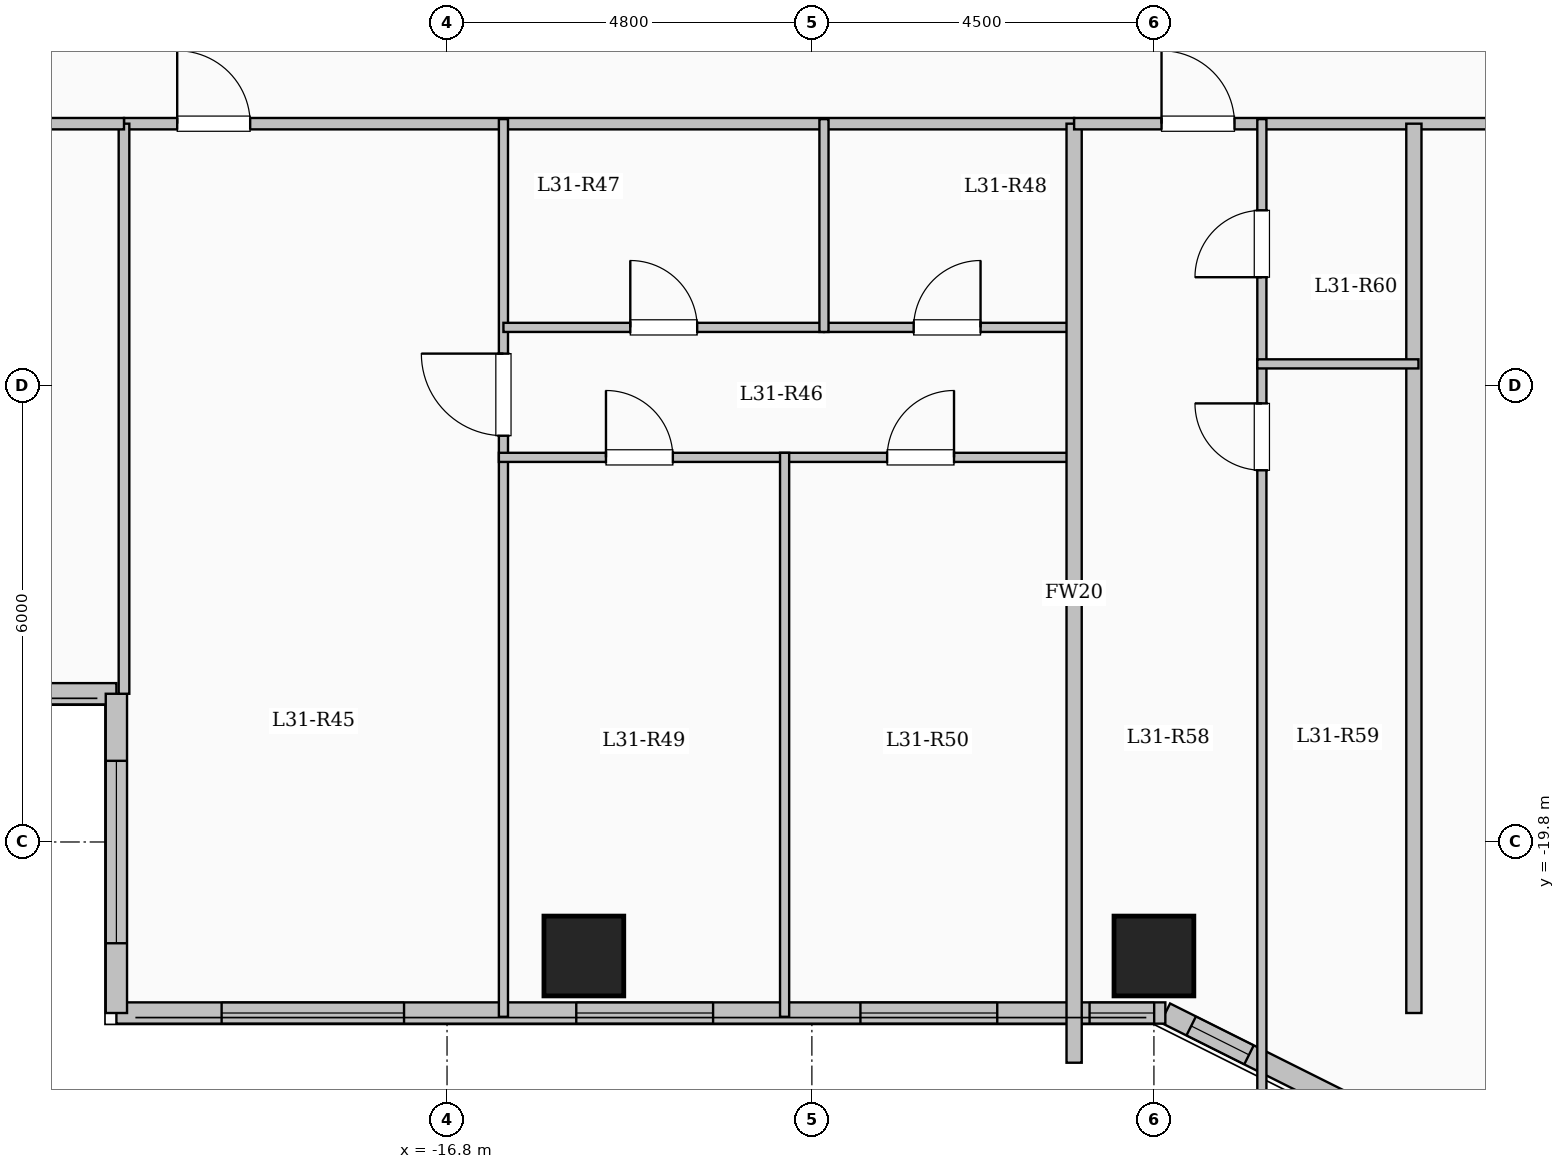
"""IFC4 building model, lengths in metres.
Left out: names, types, materials, properties, quantities, classifications, styles, units other than length and angle.
Written with IfcOpenShell. Run it as: python <this file> out.ifc"""

import sys

from ifc_helpers import new_model, si_unit, direction, frame, frame_2d, origin, origin_2d, place, context, subcontext, project, spatial, rectangle, extrude, element, fill, save


model = new_model("IFC4")
c1 = context("Model", 3, precision=1e-05, world=origin(), true_north=direction((0.0, 1.0)))
c2 = subcontext(c1, "Body", "Model", "MODEL_VIEW")
j1 = project(units=[si_unit("LENGTHUNIT", "METRE"), si_unit("PLANEANGLEUNIT", "RADIAN")], contexts=[c1])
p1 = place(None, origin())
s1 = spatial("IfcSite", under=j1, at=p1, CompositionType="ELEMENT")
p2 = place(p1, origin())
s2 = spatial("IfcBuilding", under=s1, at=p2, CompositionType="ELEMENT")
p3 = place(p2, frame((0.0, 0.0, 115.15)))
s3 = spatial("IfcBuildingStorey", under=s2, at=p3, CompositionType="ELEMENT", Elevation=115.15)
for number, where, z_axis, x_axis in (
    (1, (-15.0, -21.3, 0.0), (0.0, 0.0, 1.0), (1.0, 0.0, 0.0)),
    (2, (-7.5, -21.3, 0.0), (0.0, 0.0, 1.0), (1.0, 0.0, 0.0)),
):
    element("IfcColumn", number, at=place(p3, frame(where, z_axis=z_axis, x_axis=x_axis)), inside=s3, PredefinedType="COLUMN", context=c2, shape_type="SweptSolid", body=[
        extrude(rectangle(XDim=1.05, YDim=1.05, at=origin_2d()), origin(), (0.0, 0.0, 1.0), 3.35),
    ])
p4 = place(p3, frame((-21.15, -17.85, 0.0), z_axis=(0.0, 0.0, 1.0), x_axis=(-1.0, 0.0, 0.0)))
e3 = element("IfcWall", 3, at=p4, inside=s3, PredefinedType="SOLIDWALL", context=c2, shape_type="SweptSolid", body=[
    extrude(rectangle(XDim=5.7, YDim=0.28, at=frame_2d((2.85, 0.0))), origin(), (0.0, 0.0, 1.0), 3.05),
])
p5 = place(p4, frame((1.625, 0.0, 0.9)))
e4 = element("IfcOpeningElement", 4, at=p5, cuts=e3, PredefinedType="OPENING", context=c2, shape_type="SweptSolid", body=[
    extrude(rectangle(XDim=2.4, YDim=1.8, at=frame_2d((1.2, 0.9))), frame((0.0, 0.15, 0.0), z_axis=(0.0, -1.0, 0.0), x_axis=(1.0, 0.0, 0.0)), (0.0, 0.0, 1.0), 0.3),
])
p6 = place(p3, frame((-4.35, -23.55, 0.0), z_axis=(0.0, 0.0, 1.0), x_axis=(-0.894427191, 0.4472135955, 0.0)))
e5 = element("IfcWall", 5, at=p6, inside=s3, PredefinedType="SOLIDWALL", context=c2, shape_type="SweptSolid", body=[
    extrude(rectangle(XDim=3.354, YDim=0.28, at=frame_2d((1.677, 0.0))), origin(), (0.0, 0.0, 1.0), 3.05),
])
p7 = place(p6, frame((2.124, 0.0, 0.95)))
e6 = element("IfcOpeningElement", 6, at=p7, cuts=e5, PredefinedType="OPENING", context=c2, shape_type="SweptSolid", body=[
    extrude(rectangle(XDim=0.85, YDim=1.5, at=frame_2d((0.425, 0.75))), frame((0.0, 0.15, 0.0), z_axis=(0.0, -1.0, 0.0), x_axis=(1.0, 0.0, 0.0)), (0.0, 0.0, 1.0), 0.3),
])
p8 = place(p3, frame((-7.35, -22.05, 0.0), z_axis=(0.0, 0.0, 1.0), x_axis=(-1.0, 0.0, 0.0)))
e7 = element("IfcWall", 7, at=p8, inside=s3, PredefinedType="SOLIDWALL", context=c2, shape_type="SweptSolid", body=[
    extrude(rectangle(XDim=13.8, YDim=0.28, at=frame_2d((6.9, 0.0))), origin(), (0.0, 0.0, 1.0), 3.05),
])
p9 = place(p8, frame((0.147, 0.0, 0.95)))
e8 = element("IfcOpeningElement", 8, at=p9, cuts=e7, PredefinedType="OPENING", context=c2, shape_type="SweptSolid", body=[
    extrude(rectangle(XDim=0.85, YDim=1.5, at=frame_2d((0.425, 0.75))), frame((0.0, 0.15, 0.0), z_axis=(0.0, -1.0, 0.0), x_axis=(1.0, 0.0, 0.0)), (0.0, 0.0, 1.0), 0.3),
])
p10 = place(p8, frame((2.211, 0.0, 0.9)))
e9 = element("IfcOpeningElement", 9, at=p10, cuts=e7, PredefinedType="OPENING", context=c2, shape_type="SweptSolid", body=[
    extrude(rectangle(XDim=1.8, YDim=1.65, at=frame_2d((0.9, 0.825))), frame((0.0, 0.15, 0.0), z_axis=(0.0, -1.0, 0.0), x_axis=(1.0, 0.0, 0.0)), (0.0, 0.0, 1.0), 0.3),
])
p11 = place(p8, frame((5.95, 0.0, 0.9)))
e10 = element("IfcOpeningElement", 10, at=p11, cuts=e7, PredefinedType="OPENING", context=c2, shape_type="SweptSolid", body=[
    extrude(rectangle(XDim=1.8, YDim=1.65, at=frame_2d((0.9, 0.825))), frame((0.0, 0.15, 0.0), z_axis=(0.0, -1.0, 0.0), x_axis=(1.0, 0.0, 0.0)), (0.0, 0.0, 1.0), 0.3),
])
p12 = place(p8, frame((10.016, 0.0, 0.9)))
e11 = element("IfcOpeningElement", 11, at=p12, cuts=e7, PredefinedType="OPENING", context=c2, shape_type="SweptSolid", body=[
    extrude(rectangle(XDim=2.4, YDim=1.8, at=frame_2d((1.2, 0.9))), frame((0.0, 0.15, 0.0), z_axis=(0.0, -1.0, 0.0), x_axis=(1.0, 0.0, 0.0)), (0.0, 0.0, 1.0), 0.3),
])
p13 = place(p3, frame((-21.15, -22.05, 0.0), z_axis=(0.0, 0.0, 1.0), x_axis=(0.0, 1.0, 0.0)))
e12 = element("IfcWall", 12, at=p13, inside=s3, PredefinedType="SOLIDWALL", context=c2, shape_type="SweptSolid", body=[
    extrude(rectangle(XDim=4.2, YDim=0.28, at=frame_2d((2.1, 0.0))), origin(), (0.0, 0.0, 1.0), 3.05),
])
p14 = place(p13, frame((0.918, 0.0, 0.9)))
e13 = element("IfcOpeningElement", 13, at=p14, cuts=e12, PredefinedType="OPENING", context=c2, shape_type="SweptSolid", body=[
    extrude(rectangle(XDim=2.4, YDim=1.8, at=frame_2d((1.2, 0.9))), frame((0.0, 0.15, 0.0), z_axis=(0.0, -1.0, 0.0), x_axis=(1.0, 0.0, 0.0)), (0.0, 0.0, 1.0), 0.3),
])
p15 = place(p3, frame((-21.05, -10.35, 0.0), z_axis=(0.0, 0.0, 1.0), x_axis=(1.0, 0.0, 0.0)))
e14 = element("IfcWall", 14, at=p15, inside=s3, PredefinedType="PARTITIONING", context=c2, shape_type="SweptSolid", body=[
    extrude(rectangle(XDim=12.5, YDim=0.15, at=frame_2d((6.25, 0.0))), origin(), (0.0, 0.0, 1.0), 3.05),
])
p16 = place(p15, frame((0.7, 0.0, 0.0)))
e15 = element("IfcOpeningElement", 15, at=p16, cuts=e14, PredefinedType="OPENING", context=c2, shape_type="SweptSolid", body=[
    extrude(rectangle(XDim=0.96, YDim=2.15, at=frame_2d((0.48, 1.075))), frame((0.0, 0.085, 0.0), z_axis=(0.0, -1.0, 0.0), x_axis=(1.0, 0.0, 0.0)), (0.0, 0.0, 1.0), 0.17),
])
p17 = place(p3, frame((-16.058, -22.1, 0.0), z_axis=(0.0, 0.0, 1.0), x_axis=(0.0, 1.0, 0.0)))
e16 = element("IfcWall", 16, at=p17, inside=s3, PredefinedType="PARTITIONING", context=c2, shape_type="SweptSolid", body=[
    extrude(rectangle(XDim=11.81, YDim=0.12, at=frame_2d((5.905, 0.0))), origin(), (0.0, 0.0, 1.0), 3.05),
])
p18 = place(p17, frame((7.645, 0.0, 0.0)))
e17 = element("IfcOpeningElement", 17, at=p18, cuts=e16, PredefinedType="OPENING", context=c2, shape_type="SweptSolid", body=[
    extrude(rectangle(XDim=1.08, YDim=2.15, at=frame_2d((0.54, 1.075))), frame((0.0, 0.07, 0.0), z_axis=(0.0, -1.0, 0.0), x_axis=(1.0, 0.0, 0.0)), (0.0, 0.0, 1.0), 0.14),
])
p19 = place(p3, frame((-16.058, -13.03, 0.0), z_axis=(0.0, 0.0, 1.0), x_axis=(1.0, 0.0, 0.0)))
e18 = element("IfcWall", 18, at=p19, inside=s3, PredefinedType="PARTITIONING", context=c2, shape_type="SweptSolid", body=[
    extrude(rectangle(XDim=4.217, YDim=0.12, at=frame_2d((2.108, 0.0))), origin(), (0.0, 0.0, 1.0), 3.05),
])
p20 = place(p19, frame((1.669, 0.0, 0.0)))
e19 = element("IfcOpeningElement", 19, at=p20, cuts=e18, PredefinedType="OPENING", context=c2, shape_type="SweptSolid", body=[
    extrude(rectangle(XDim=0.88, YDim=2.1, at=frame_2d((0.44, 1.05))), frame((0.0, 0.07, 0.0), z_axis=(0.0, -1.0, 0.0), x_axis=(1.0, 0.0, 0.0)), (0.0, 0.0, 1.0), 0.14),
])
p21 = place(p3, frame((-11.841, -13.03, 0.0), z_axis=(0.0, 0.0, 1.0), x_axis=(1.0, 0.0, 0.0)))
e20 = element("IfcWall", 20, at=p21, inside=s3, PredefinedType="PARTITIONING", context=c2, shape_type="SweptSolid", body=[
    extrude(rectangle(XDim=3.241, YDim=0.12, at=frame_2d((1.621, 0.0))), origin(), (0.0, 0.0, 1.0), 3.05),
])
p22 = place(p21, frame((1.18, 0.0, 0.0)))
e21 = element("IfcOpeningElement", 21, at=p22, cuts=e20, PredefinedType="OPENING", context=c2, shape_type="SweptSolid", body=[
    extrude(rectangle(XDim=0.88, YDim=2.1, at=frame_2d((0.44, 1.05))), frame((0.0, 0.07, 0.0), z_axis=(0.0, -1.0, 0.0), x_axis=(1.0, 0.0, 0.0)), (0.0, 0.0, 1.0), 0.14),
])
p23 = place(p3, frame((-16.118, -14.74, 0.0), z_axis=(0.0, 0.0, 1.0), x_axis=(1.0, 0.0, 0.0)))
e22 = element("IfcWall", 22, at=p23, inside=s3, PredefinedType="PARTITIONING", context=c2, shape_type="SweptSolid", body=[
    extrude(rectangle(XDim=7.578, YDim=0.12, at=frame_2d((3.789, 0.0))), origin(), (0.0, 0.0, 1.0), 3.05),
])
p24 = place(p23, frame((1.409, 0.0, 0.0)))
e23 = element("IfcOpeningElement", 23, at=p24, cuts=e22, PredefinedType="OPENING", context=c2, shape_type="SweptSolid", body=[
    extrude(rectangle(XDim=0.88, YDim=2.1, at=frame_2d((0.44, 1.05))), frame((0.0, 0.07, 0.0), z_axis=(0.0, -1.0, 0.0), x_axis=(1.0, 0.0, 0.0)), (0.0, 0.0, 1.0), 0.14),
])
p25 = place(p23, frame((5.108, 0.0, 0.0)))
e24 = element("IfcOpeningElement", 24, at=p25, cuts=e22, PredefinedType="OPENING", context=c2, shape_type="SweptSolid", body=[
    extrude(rectangle(XDim=0.88, YDim=2.1, at=frame_2d((0.44, 1.05))), frame((0.0, 0.07, 0.0), z_axis=(0.0, -1.0, 0.0), x_axis=(1.0, 0.0, 0.0)), (0.0, 0.0, 1.0), 0.14),
])
p26 = place(p3, frame((-11.841, -13.09, 0.0), z_axis=(0.0, 0.0, 1.0), x_axis=(0.0, 1.0, 0.0)))
e25 = element("IfcWall", 25, at=p26, inside=s3, PredefinedType="PARTITIONING", context=c2, shape_type="SweptSolid", body=[
    extrude(rectangle(XDim=2.8, YDim=0.12, at=frame_2d((1.4, 0.0))), origin(), (0.0, 0.0, 1.0), 3.05),
])
p27 = place(p3, frame((-12.359, -22.1, 0.0), z_axis=(0.0, 0.0, 1.0), x_axis=(0.0, 1.0, 0.0)))
e26 = element("IfcWall", 26, at=p27, inside=s3, PredefinedType="PARTITIONING", context=c2, shape_type="SweptSolid", body=[
    extrude(rectangle(XDim=7.42, YDim=0.12, at=frame_2d((3.71, 0.0))), origin(), (0.0, 0.0, 1.0), 3.05),
])
p28 = place(p3, frame((-8.55, -22.704, 0.0), z_axis=(0.0, 0.0, 1.0), x_axis=(0.0, 1.0, 0.0)))
e27 = element("IfcWall", 27, at=p28, inside=s3, PredefinedType="SOLIDWALL", context=c2, shape_type="SweptSolid", body=[
    extrude(rectangle(XDim=12.354, YDim=0.2, at=frame_2d((6.177, 0.0))), origin(), (0.0, 0.0, 1.0), 3.05),
])
p29 = place(p3, frame((-8.55, -10.35, 0.0), z_axis=(0.0, 0.0, 1.0), x_axis=(1.0, 0.0, 0.0)))
e28 = element("IfcWall", 28, at=p29, inside=s3, PredefinedType="PARTITIONING", context=c2, shape_type="SweptSolid", body=[
    extrude(rectangle(XDim=17.1, YDim=0.15, at=frame_2d((8.55, 0.0))), origin(), (0.0, 0.0, 1.0), 3.05),
])
p30 = place(p29, frame((1.15, 0.0, 0.0)))
e29 = element("IfcOpeningElement", 29, at=p30, cuts=e28, PredefinedType="OPENING", context=c2, shape_type="SweptSolid", body=[
    extrude(rectangle(XDim=0.96, YDim=2.15, at=frame_2d((0.48, 1.075))), frame((0.0, 0.085, 0.0), z_axis=(0.0, -1.0, 0.0), x_axis=(1.0, 0.0, 0.0)), (0.0, 0.0, 1.0), 0.17),
])
p31 = place(p29, frame((10.5, 0.0, 0.0)))
e30 = element("IfcOpeningElement", 30, at=p31, cuts=e28, PredefinedType="OPENING", context=c2, shape_type="SweptSolid", body=[
    extrude(rectangle(XDim=0.96, YDim=2.15, at=frame_2d((0.48, 1.075))), frame((0.0, 0.085, 0.0), z_axis=(0.0, -1.0, 0.0), x_axis=(1.0, 0.0, 0.0)), (0.0, 0.0, 1.0), 0.17),
])
p32 = place(p3, frame((-4.08, -22.05, 0.0), z_axis=(0.0, 0.0, 1.0), x_axis=(0.0, 1.0, 0.0)))
e31 = element("IfcWall", 31, at=p32, inside=s3, PredefinedType="SOLIDWALL", context=c2, shape_type="SweptSolid", body=[
    extrude(rectangle(XDim=11.7, YDim=0.2, at=frame_2d((5.85, 0.0))), origin(), (0.0, 0.0, 1.0), 3.05),
])
p33 = place(p3, frame((-6.08, -23.314, 0.0), z_axis=(0.0, 0.0, 1.0), x_axis=(0.0, 1.0, 0.0)))
e32 = element("IfcWall", 32, at=p33, inside=s3, PredefinedType="PARTITIONING", context=c2, shape_type="SweptSolid", body=[
    extrude(rectangle(XDim=9.804, YDim=0.12, at=frame_2d((4.902, 0.0))), origin(), (0.0, 0.0, 1.0), 3.05),
])
p34 = place(p33, frame((8.404, 0.0, 0.0)))
e33 = element("IfcOpeningElement", 33, at=p34, cuts=e32, PredefinedType="OPENING", context=c2, shape_type="SweptSolid", body=[
    extrude(rectangle(XDim=0.88, YDim=2.1, at=frame_2d((0.44, 1.05))), frame((0.0, 0.07, 0.0), z_axis=(0.0, -1.0, 0.0), x_axis=(1.0, 0.0, 0.0)), (0.0, 0.0, 1.0), 0.14),
])
p35 = place(p3, frame((-6.08, -13.51, 0.0), z_axis=(0.0, 0.0, 1.0), x_axis=(0.0, 1.0, 0.0)))
e34 = element("IfcWall", 34, at=p35, inside=s3, PredefinedType="PARTITIONING", context=c2, shape_type="SweptSolid", body=[
    extrude(rectangle(XDim=3.22, YDim=0.12, at=frame_2d((1.61, 0.0))), origin(), (0.0, 0.0, 1.0), 3.05),
])
p36 = place(p35, frame((1.14, 0.0, 0.0)))
e35 = element("IfcOpeningElement", 35, at=p36, cuts=e34, PredefinedType="OPENING", context=c2, shape_type="SweptSolid", body=[
    extrude(rectangle(XDim=0.88, YDim=2.1, at=frame_2d((0.44, 1.05))), frame((0.0, 0.07, 0.0), z_axis=(0.0, -1.0, 0.0), x_axis=(1.0, 0.0, 0.0)), (0.0, 0.0, 1.0), 0.14),
])
p37 = place(p3, frame((-6.14, -13.51, 0.0), z_axis=(0.0, 0.0, 1.0), x_axis=(1.0, 0.0, 0.0)))
e36 = element("IfcWall", 36, at=p37, inside=s3, PredefinedType="PARTITIONING", context=c2, shape_type="SweptSolid", body=[
    extrude(rectangle(XDim=2.12, YDim=0.12, at=frame_2d((1.06, 0.0))), origin(), (0.0, 0.0, 1.0), 3.05),
])
p38 = place(p3, frame((-21.05, -17.85, 0.0), z_axis=(0.0, 0.0, 1.0), x_axis=(0.0, 1.0, 0.0)))
e37 = element("IfcWall", 37, at=p38, inside=s3, PredefinedType="PARTITIONING", context=c2, shape_type="SweptSolid", body=[
    extrude(rectangle(XDim=7.5, YDim=0.14, at=frame_2d((3.75, 0.0))), origin(), (0.0, 0.0, 1.0), 3.05),
])
p39 = place(p3, frame((-26.88, -10.35, 0.0), z_axis=(0.0, 0.0, 1.0), x_axis=(1.0, 0.0, 0.0)))
e38 = element("IfcWall", 38, at=p39, inside=s3, PredefinedType="PARTITIONING", context=c2, shape_type="SweptSolid", body=[
    extrude(rectangle(XDim=5.83, YDim=0.15, at=frame_2d((2.915, 0.0))), origin(), (0.0, 0.0, 1.0), 3.05),
])
p40 = place(p39, frame((2.44, 0.0, 0.0)))
e39 = element("IfcOpeningElement", 39, at=p40, cuts=e38, PredefinedType="OPENING", context=c2, shape_type="SweptSolid", body=[
    extrude(rectangle(XDim=0.95, YDim=2.15, at=frame_2d((0.475, 1.075))), frame((0.0, 0.085, 0.0), z_axis=(0.0, -1.0, 0.0), x_axis=(1.0, 0.0, 0.0)), (0.0, 0.0, 1.0), 0.17),
])
p41 = place(p7, origin())
e40 = element("IfcWindow", 40, at=p41, inside=s3, PartitioningType="SINGLE_PANEL", PredefinedType="WINDOW", context=c2, shape_type="SweptSolid", body=[
    extrude(rectangle(XDim=0.85, YDim=1.5, at=frame_2d((0.425, 0.75))), frame((0.0, 0.03, 0.0), z_axis=(0.0, -1.0, 0.0), x_axis=(1.0, 0.0, 0.0)), (0.0, 0.0, 1.0), 0.06),
])
fill(e6, e40)
p42 = place(p9, origin())
e41 = element("IfcWindow", 41, at=p42, inside=s3, PartitioningType="SINGLE_PANEL", PredefinedType="WINDOW", context=c2, shape_type="SweptSolid", body=[
    extrude(rectangle(XDim=0.85, YDim=1.5, at=frame_2d((0.425, 0.75))), frame((0.0, 0.03, 0.0), z_axis=(0.0, -1.0, 0.0), x_axis=(1.0, 0.0, 0.0)), (0.0, 0.0, 1.0), 0.06),
])
fill(e8, e41)
p43 = place(p10, origin())
e42 = element("IfcWindow", 42, at=p43, inside=s3, PartitioningType="SINGLE_PANEL", PredefinedType="WINDOW", context=c2, shape_type="SweptSolid", body=[
    extrude(rectangle(XDim=1.8, YDim=1.65, at=frame_2d((0.9, 0.825))), frame((0.0, 0.03, 0.0), z_axis=(0.0, -1.0, 0.0), x_axis=(1.0, 0.0, 0.0)), (0.0, 0.0, 1.0), 0.06),
])
fill(e9, e42)
p44 = place(p11, origin())
e43 = element("IfcWindow", 43, at=p44, inside=s3, PartitioningType="SINGLE_PANEL", PredefinedType="WINDOW", context=c2, shape_type="SweptSolid", body=[
    extrude(rectangle(XDim=1.8, YDim=1.65, at=frame_2d((0.9, 0.825))), frame((0.0, 0.03, 0.0), z_axis=(0.0, -1.0, 0.0), x_axis=(1.0, 0.0, 0.0)), (0.0, 0.0, 1.0), 0.06),
])
fill(e10, e43)
p45 = place(p12, origin())
e44 = element("IfcWindow", 44, at=p45, inside=s3, PartitioningType="SINGLE_PANEL", PredefinedType="WINDOW", context=c2, shape_type="SweptSolid", body=[
    extrude(rectangle(XDim=2.4, YDim=1.8, at=frame_2d((1.2, 0.9))), frame((0.0, 0.03, 0.0), z_axis=(0.0, -1.0, 0.0), x_axis=(1.0, 0.0, 0.0)), (0.0, 0.0, 1.0), 0.06),
])
fill(e11, e44)
p46 = place(p14, origin())
e45 = element("IfcWindow", 45, at=p46, inside=s3, PartitioningType="SINGLE_PANEL", PredefinedType="WINDOW", context=c2, shape_type="SweptSolid", body=[
    extrude(rectangle(XDim=2.4, YDim=1.8, at=frame_2d((1.2, 0.9))), frame((0.0, 0.03, 0.0), z_axis=(0.0, -1.0, 0.0), x_axis=(1.0, 0.0, 0.0)), (0.0, 0.0, 1.0), 0.06),
])
fill(e13, e45)
p47 = place(p16, origin())
e46 = element("IfcDoor", 46, at=p47, inside=s3, OperationType="SINGLE_SWING_LEFT", PredefinedType="DOOR", context=c2, shape_type="SweptSolid", body=[
    extrude(rectangle(XDim=0.96, YDim=2.15, at=frame_2d((0.48, 1.075))), frame((0.0, 0.025, 0.0), z_axis=(0.0, -1.0, 0.0), x_axis=(1.0, 0.0, 0.0)), (0.0, 0.0, 1.0), 0.05),
])
fill(e15, e46)
p48 = place(p18, origin())
e47 = element("IfcDoor", 47, at=p48, inside=s3, OperationType="SINGLE_SWING_RIGHT", PredefinedType="DOOR", context=c2, shape_type="SweptSolid", body=[
    extrude(rectangle(XDim=1.08, YDim=2.15, at=frame_2d((0.54, 1.075))), frame((0.0, 0.025, 0.0), z_axis=(0.0, -1.0, 0.0), x_axis=(1.0, 0.0, 0.0)), (0.0, 0.0, 1.0), 0.05),
])
fill(e17, e47)
p49 = place(p20, origin())
e48 = element("IfcDoor", 48, at=p49, inside=s3, OperationType="SINGLE_SWING_LEFT", PredefinedType="DOOR", context=c2, shape_type="SweptSolid", body=[
    extrude(rectangle(XDim=0.88, YDim=2.1, at=frame_2d((0.44, 1.05))), frame((0.0, 0.025, 0.0), z_axis=(0.0, -1.0, 0.0), x_axis=(1.0, 0.0, 0.0)), (0.0, 0.0, 1.0), 0.05),
])
fill(e19, e48)
p50 = place(p22, origin())
e49 = element("IfcDoor", 49, at=p50, inside=s3, OperationType="SINGLE_SWING_RIGHT", PredefinedType="DOOR", context=c2, shape_type="SweptSolid", body=[
    extrude(rectangle(XDim=0.88, YDim=2.1, at=frame_2d((0.44, 1.05))), frame((0.0, 0.025, 0.0), z_axis=(0.0, -1.0, 0.0), x_axis=(1.0, 0.0, 0.0)), (0.0, 0.0, 1.0), 0.05),
])
fill(e21, e49)
p51 = place(p24, origin())
e50 = element("IfcDoor", 50, at=p51, inside=s3, OperationType="SINGLE_SWING_LEFT", PredefinedType="DOOR", context=c2, shape_type="SweptSolid", body=[
    extrude(rectangle(XDim=0.88, YDim=2.1, at=frame_2d((0.44, 1.05))), frame((0.0, 0.025, 0.0), z_axis=(0.0, -1.0, 0.0), x_axis=(1.0, 0.0, 0.0)), (0.0, 0.0, 1.0), 0.05),
])
fill(e23, e50)
p52 = place(p25, origin())
e51 = element("IfcDoor", 51, at=p52, inside=s3, OperationType="SINGLE_SWING_RIGHT", PredefinedType="DOOR", context=c2, shape_type="SweptSolid", body=[
    extrude(rectangle(XDim=0.88, YDim=2.1, at=frame_2d((0.44, 1.05))), frame((0.0, 0.025, 0.0), z_axis=(0.0, -1.0, 0.0), x_axis=(1.0, 0.0, 0.0)), (0.0, 0.0, 1.0), 0.05),
])
fill(e24, e51)
p53 = place(p30, origin())
e52 = element("IfcDoor", 52, at=p53, inside=s3, OperationType="SINGLE_SWING_LEFT", PredefinedType="DOOR", context=c2, shape_type="SweptSolid", body=[
    extrude(rectangle(XDim=0.96, YDim=2.15, at=frame_2d((0.48, 1.075))), frame((0.0, 0.025, 0.0), z_axis=(0.0, -1.0, 0.0), x_axis=(1.0, 0.0, 0.0)), (0.0, 0.0, 1.0), 0.05),
])
fill(e29, e52)
p54 = place(p34, origin())
e53 = element("IfcDoor", 53, at=p54, inside=s3, OperationType="SINGLE_SWING_RIGHT", PredefinedType="DOOR", context=c2, shape_type="SweptSolid", body=[
    extrude(rectangle(XDim=0.88, YDim=2.1, at=frame_2d((0.44, 1.05))), frame((0.0, 0.025, 0.0), z_axis=(0.0, -1.0, 0.0), x_axis=(1.0, 0.0, 0.0)), (0.0, 0.0, 1.0), 0.05),
])
fill(e33, e53)
p55 = place(p36, origin())
e54 = element("IfcDoor", 54, at=p55, inside=s3, OperationType="SINGLE_SWING_LEFT", PredefinedType="DOOR", context=c2, shape_type="SweptSolid", body=[
    extrude(rectangle(XDim=0.88, YDim=2.1, at=frame_2d((0.44, 1.05))), frame((0.0, 0.025, 0.0), z_axis=(0.0, -1.0, 0.0), x_axis=(1.0, 0.0, 0.0)), (0.0, 0.0, 1.0), 0.05),
])
fill(e35, e54)
save(model, sys.argv[1])
